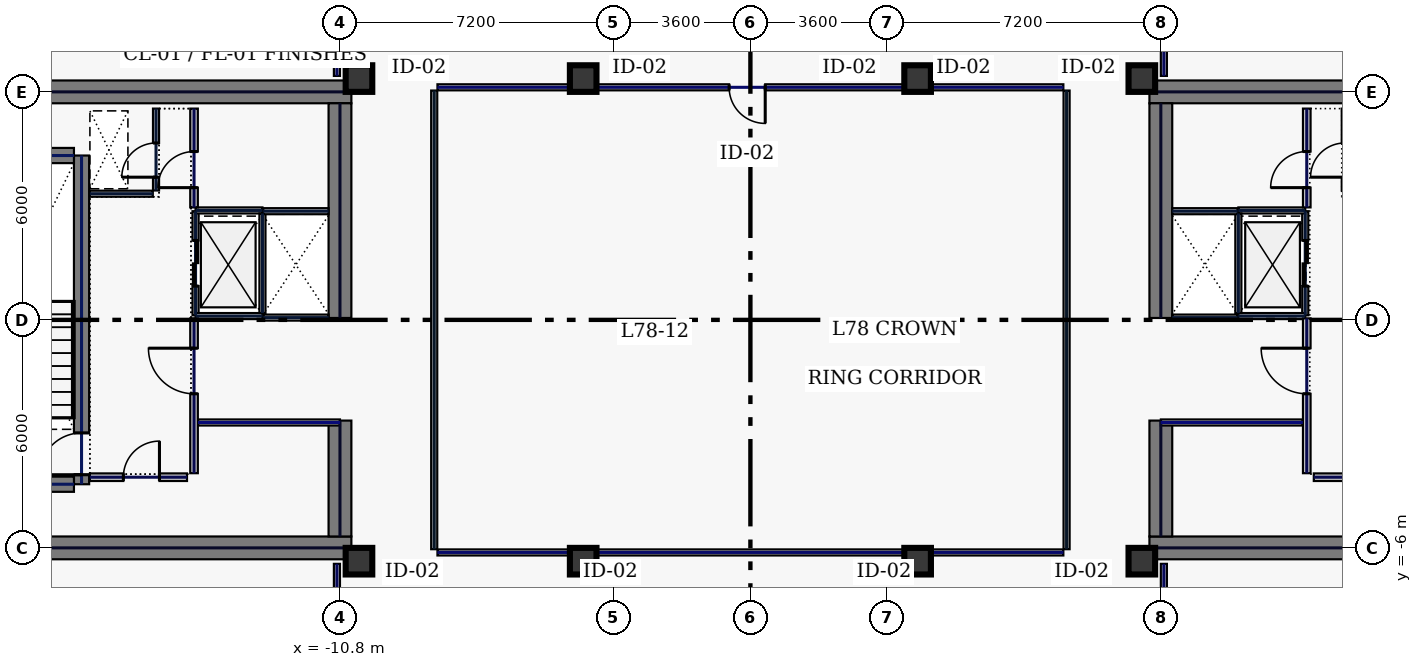
"""IFC4 building model, lengths in metres.
Left out: names, types, materials, properties, quantities, classifications, styles, units other than length and angle.
Written with IfcOpenShell. Run it as: python <this file> out.ifc"""

import sys

from ifc_helpers import new_model, si_unit, direction, frame, frame_2d, origin, origin_2d, place, context, subcontext, project, spatial, rectangle, hollow_rectangle, extrude, element, fill, save


model = new_model("IFC4")
c1 = context("Model", 3, precision=1e-05, world=origin(), true_north=direction((0.0, 1.0)))
c2 = subcontext(c1, "Body", "Model", "MODEL_VIEW")
j1 = project(units=[si_unit("LENGTHUNIT", "METRE"), si_unit("PLANEANGLEUNIT", "RADIAN")], contexts=[c1])
p1 = place(None, origin())
s1 = spatial("IfcSite", under=j1, at=p1, CompositionType="ELEMENT")
p2 = place(p1, origin())
s2 = spatial("IfcBuilding", under=s1, at=p2, CompositionType="ELEMENT")
p3 = place(p2, frame((0.0, 0.0, 333.0)))
s3 = spatial("IfcBuildingStorey", under=s2, at=p3, CompositionType="ELEMENT", Elevation=333.0)
for number, where, z_axis, x_axis in (
    (1, (-22.0, 6.0, 0.0), (0.0, 0.0, 1.0), (1.0, 0.0, 0.0)),
    (2, (-22.0, -6.0, 0.0), (0.0, 0.0, 1.0), (1.0, 0.0, 0.0)),
):
    element("IfcWall", number, at=place(p3, frame(where, z_axis=z_axis, x_axis=x_axis)), inside=s3, PredefinedType="SHEAR", context=c2, shape_type="SweptSolid", body=[
        extrude(rectangle(XDim=11.5, YDim=0.6, at=frame_2d((5.75, 0.0))), origin(), (0.0, 0.0, 1.0), 6.5),
    ])
p4 = place(p3, frame((-10.8, -5.7, 0.0), z_axis=(0.0, 0.0, 1.0), x_axis=(0.0, 1.0, 0.0)))
e3 = element("IfcWall", 3, at=p4, inside=s3, PredefinedType="SHEAR", context=c2, shape_type="SweptSolid", body=[
    extrude(rectangle(XDim=3.05, YDim=0.6, at=frame_2d((1.525, 0.0))), origin(), (0.0, 0.0, 1.0), 6.5),
])
p5 = place(p3, frame((-10.8, 0.05, 0.0), z_axis=(0.0, 0.0, 1.0), x_axis=(0.0, 1.0, 0.0)))
e4 = element("IfcWall", 4, at=p5, inside=s3, PredefinedType="SHEAR", context=c2, shape_type="SweptSolid", body=[
    extrude(rectangle(XDim=5.65, YDim=0.6, at=frame_2d((2.825, 0.0))), origin(), (0.0, 0.0, 1.0), 6.5),
])
p6 = place(p3, frame((-17.6, -4.325, 0.0), z_axis=(0.0, 0.0, 1.0), x_axis=(0.0, 1.0, 0.0)))
e5 = element("IfcWall", 5, at=p6, inside=s3, PredefinedType="SHEAR", context=c2, shape_type="SweptSolid", body=[
    extrude(rectangle(XDim=8.65, YDim=0.4, at=frame_2d((4.325, 0.0))), origin(), (0.0, 0.0, 1.0), 6.5),
])
p7 = place(p6, frame((0.25, 0.0, 0.0)))
e6 = element("IfcOpeningElement", 6, at=p7, cuts=e5, PredefinedType="OPENING", context=c2, shape_type="SweptSolid", body=[
    extrude(rectangle(XDim=1.1, YDim=2.2, at=frame_2d((0.55, 1.1))), frame((0.0, 0.21, 0.0), z_axis=(0.0, -1.0, 0.0), x_axis=(1.0, 0.0, 0.0)), (0.0, 0.0, 1.0), 0.42),
])
for number, where, z_axis, x_axis in (
    (7, (-21.2, -4.325, 0.0), (0.0, 0.0, 1.0), (1.0, 0.0, 0.0)),
    (8, (-21.2, 4.325, 0.0), (0.0, 0.0, 1.0), (1.0, 0.0, 0.0)),
):
    element("IfcWall", number, at=place(p3, frame(where, z_axis=z_axis, x_axis=x_axis)), inside=s3, PredefinedType="SHEAR", context=c2, shape_type="SweptSolid", body=[
        extrude(rectangle(XDim=3.4, YDim=0.4, at=frame_2d((1.7, 0.0))), origin(), (0.0, 0.0, 1.0), 6.5),
    ])
for number, where, z_axis, x_axis in (
    (9, (10.5, 6.0, 0.0), (0.0, 0.0, 1.0), (1.0, 0.0, 0.0)),
    (10, (10.5, -6.0, 0.0), (0.0, 0.0, 1.0), (1.0, 0.0, 0.0)),
):
    element("IfcWall", number, at=place(p3, frame(where, z_axis=z_axis, x_axis=x_axis)), inside=s3, PredefinedType="SHEAR", context=c2, shape_type="SweptSolid", body=[
        extrude(rectangle(XDim=11.5, YDim=0.6, at=frame_2d((5.75, 0.0))), origin(), (0.0, 0.0, 1.0), 6.5),
    ])
p8 = place(p3, frame((10.8, -5.7, 0.0), z_axis=(0.0, 0.0, 1.0), x_axis=(0.0, 1.0, 0.0)))
e11 = element("IfcWall", 11, at=p8, inside=s3, PredefinedType="SHEAR", context=c2, shape_type="SweptSolid", body=[
    extrude(rectangle(XDim=3.05, YDim=0.6, at=frame_2d((1.525, 0.0))), origin(), (0.0, 0.0, 1.0), 6.5),
])
p9 = place(p3, frame((10.8, 0.05, 0.0), z_axis=(0.0, 0.0, 1.0), x_axis=(0.0, 1.0, 0.0)))
e12 = element("IfcWall", 12, at=p9, inside=s3, PredefinedType="SHEAR", context=c2, shape_type="SweptSolid", body=[
    extrude(rectangle(XDim=5.65, YDim=0.6, at=frame_2d((2.825, 0.0))), origin(), (0.0, 0.0, 1.0), 6.5),
])
for number, where, z_axis, x_axis in (
    (13, (-10.3, -6.35, 0.0), (0.0, 0.0, 1.0), (1.0, 0.0, 0.0)),
    (14, (-10.3, 6.35, 0.0), (0.0, 0.0, 1.0), (1.0, 0.0, 0.0)),
    (15, (10.3, -6.35, 0.0), (0.0, 0.0, 1.0), (1.0, 0.0, 0.0)),
    (16, (10.3, 6.35, 0.0), (0.0, 0.0, 1.0), (1.0, 0.0, 0.0)),
    (17, (-4.4, -6.35, 0.0), (0.0, 0.0, 1.0), (1.0, 0.0, 0.0)),
    (18, (4.4, -6.35, 0.0), (0.0, 0.0, 1.0), (1.0, 0.0, 0.0)),
    (19, (-4.4, 6.35, 0.0), (0.0, 0.0, 1.0), (1.0, 0.0, 0.0)),
    (20, (4.4, 6.35, 0.0), (0.0, 0.0, 1.0), (1.0, 0.0, 0.0)),
):
    element("IfcColumn", number, at=place(p3, frame(where, z_axis=z_axis, x_axis=x_axis)), inside=s3, PredefinedType="COLUMN", context=c2, shape_type="SweptSolid", body=[
        extrude(hollow_rectangle(XDim=0.7, YDim=0.7, WallThickness=0.032, at=origin_2d()), origin(), (0.0, 0.0, 1.0), 6.5),
    ])
p10 = place(p3, frame((-14.6, 0.12, 0.0), z_axis=(0.0, 0.0, 1.0), x_axis=(0.0, 1.0, 0.0)))
e21 = element("IfcWall", 21, at=p10, inside=s3, PredefinedType="PARTITIONING", context=c2, shape_type="SweptSolid", body=[
    extrude(rectangle(XDim=2.74, YDim=0.16, at=frame_2d((1.37, 0.0))), origin(), (0.0, 0.0, 1.0), 6.5),
])
p11 = place(p10, frame((0.77, 0.0, 0.0)))
e22 = element("IfcOpeningElement", 22, at=p11, cuts=e21, PredefinedType="OPENING", context=c2, shape_type="SweptSolid", body=[
    extrude(rectangle(XDim=1.2, YDim=2.2, at=frame_2d((0.6, 1.1))), frame((0.0, 0.09, 0.0), z_axis=(0.0, -1.0, 0.0), x_axis=(1.0, 0.0, 0.0)), (0.0, 0.0, 1.0), 0.18),
])
for number, where, z_axis, x_axis in (
    (23, (-14.6, 0.1, 0.0), (0.0, 0.0, 1.0), (1.0, 0.0, 0.0)),
    (24, (-14.6, 2.88, 0.0), (0.0, 0.0, 1.0), (1.0, 0.0, 0.0)),
):
    element("IfcWall", number, at=place(p3, frame(where, z_axis=z_axis, x_axis=x_axis)), inside=s3, PredefinedType="PARTITIONING", context=c2, shape_type="SweptSolid", body=[
        extrude(rectangle(XDim=1.76, YDim=0.16, at=frame_2d((0.88, 0.0))), origin(), (0.0, 0.0, 1.0), 6.5),
    ])
p12 = place(p3, frame((-12.84, 0.18, 0.0), z_axis=(0.0, 0.0, 1.0), x_axis=(0.0, 1.0, 0.0)))
e25 = element("IfcWall", 25, at=p12, inside=s3, PredefinedType="PARTITIONING", context=c2, shape_type="SweptSolid", body=[
    extrude(rectangle(XDim=2.62, YDim=0.16, at=frame_2d((1.31, 0.0))), origin(), (0.0, 0.0, 1.0), 6.5),
])
for number, where, z_axis, x_axis in (
    (26, (-12.82, 0.06, 0.0), (0.0, 0.0, 1.0), (1.0, 0.0, 0.0)),
    (27, (-12.82, 2.86, 0.0), (0.0, 0.0, 1.0), (1.0, 0.0, 0.0)),
):
    element("IfcWall", number, at=place(p3, frame(where, z_axis=z_axis, x_axis=x_axis)), inside=s3, PredefinedType="PARTITIONING", context=c2, shape_type="SweptSolid", body=[
        extrude(rectangle(XDim=1.72, YDim=0.16, at=frame_2d((0.86, 0.0))), origin(), (0.0, 0.0, 1.0), 6.5),
    ])
p13 = place(p3, frame((14.6, 0.12, 0.0), z_axis=(0.0, 0.0, 1.0), x_axis=(0.0, 1.0, 0.0)))
e28 = element("IfcWall", 28, at=p13, inside=s3, PredefinedType="PARTITIONING", context=c2, shape_type="SweptSolid", body=[
    extrude(rectangle(XDim=2.74, YDim=0.16, at=frame_2d((1.37, 0.0))), origin(), (0.0, 0.0, 1.0), 6.5),
])
p14 = place(p13, frame((0.77, 0.0, 0.0)))
e29 = element("IfcOpeningElement", 29, at=p14, cuts=e28, PredefinedType="OPENING", context=c2, shape_type="SweptSolid", body=[
    extrude(rectangle(XDim=1.2, YDim=2.2, at=frame_2d((0.6, 1.1))), frame((0.0, 0.09, 0.0), z_axis=(0.0, -1.0, 0.0), x_axis=(1.0, 0.0, 0.0)), (0.0, 0.0, 1.0), 0.18),
])
for number, where, z_axis, x_axis in (
    (30, (12.84, 0.1, 0.0), (0.0, 0.0, 1.0), (1.0, 0.0, 0.0)),
    (31, (12.84, 2.88, 0.0), (0.0, 0.0, 1.0), (1.0, 0.0, 0.0)),
):
    element("IfcWall", number, at=place(p3, frame(where, z_axis=z_axis, x_axis=x_axis)), inside=s3, PredefinedType="PARTITIONING", context=c2, shape_type="SweptSolid", body=[
        extrude(rectangle(XDim=1.76, YDim=0.16, at=frame_2d((0.88, 0.0))), origin(), (0.0, 0.0, 1.0), 6.5),
    ])
p15 = place(p3, frame((12.84, 0.18, 0.0), z_axis=(0.0, 0.0, 1.0), x_axis=(0.0, 1.0, 0.0)))
e32 = element("IfcWall", 32, at=p15, inside=s3, PredefinedType="PARTITIONING", context=c2, shape_type="SweptSolid", body=[
    extrude(rectangle(XDim=2.62, YDim=0.16, at=frame_2d((1.31, 0.0))), origin(), (0.0, 0.0, 1.0), 6.5),
])
for number, where, z_axis, x_axis in (
    (33, (11.1, 0.06, 0.0), (0.0, 0.0, 1.0), (1.0, 0.0, 0.0)),
    (34, (11.1, 2.86, 0.0), (0.0, 0.0, 1.0), (1.0, 0.0, 0.0)),
):
    element("IfcWall", number, at=place(p3, frame(where, z_axis=z_axis, x_axis=x_axis)), inside=s3, PredefinedType="PARTITIONING", context=c2, shape_type="SweptSolid", body=[
        extrude(rectangle(XDim=1.72, YDim=0.16, at=frame_2d((0.86, 0.0))), origin(), (0.0, 0.0, 1.0), 6.5),
    ])
p16 = place(p3, frame((-15.64, 3.405, 0.0), z_axis=(0.0, 0.0, 1.0), x_axis=(0.0, 1.0, 0.0)))
e35 = element("IfcWall", 35, at=p16, inside=s3, PredefinedType="PARTITIONING", context=c2, shape_type="SweptSolid", body=[
    extrude(rectangle(XDim=2.155, YDim=0.16, at=frame_2d((1.078, 0.0))), origin(), (0.0, 0.0, 1.0), 6.5),
])
p17 = place(p16, frame((0.35, 0.0, 0.0)))
e36 = element("IfcOpeningElement", 36, at=p17, cuts=e35, PredefinedType="OPENING", context=c2, shape_type="SweptSolid", body=[
    extrude(rectangle(XDim=0.9, YDim=2.2, at=frame_2d((0.45, 1.1))), frame((0.0, 0.09, 0.0), z_axis=(0.0, -1.0, 0.0), x_axis=(1.0, 0.0, 0.0)), (0.0, 0.0, 1.0), 0.18),
])
p18 = place(p3, frame((-17.38, 3.32, 0.0), z_axis=(0.0, 0.0, 1.0), x_axis=(1.0, 0.0, 0.0)))
e37 = element("IfcWall", 37, at=p18, inside=s3, PredefinedType="PARTITIONING", context=c2, shape_type="SweptSolid", body=[
    extrude(rectangle(XDim=1.655, YDim=0.16, at=frame_2d((0.827, 0.0))), origin(), (0.0, 0.0, 1.0), 6.5),
])
p19 = place(p3, frame((-17.38, -4.14, 0.0), z_axis=(0.0, 0.0, 1.0), x_axis=(1.0, 0.0, 0.0)))
e38 = element("IfcWall", 38, at=p19, inside=s3, PredefinedType="SOLIDWALL", context=c2, shape_type="SweptSolid", body=[
    extrude(rectangle(XDim=2.555, YDim=0.2, at=frame_2d((1.277, 0.0))), origin(), (0.0, 0.0, 1.0), 6.5),
])
p20 = place(p19, frame((0.88, 0.0, 0.0)))
e39 = element("IfcOpeningElement", 39, at=p20, cuts=e38, PredefinedType="OPENING", context=c2, shape_type="SweptSolid", body=[
    extrude(rectangle(XDim=0.95, YDim=2.2, at=frame_2d((0.475, 1.1))), frame((0.0, 0.11, 0.0), z_axis=(0.0, -1.0, 0.0), x_axis=(1.0, 0.0, 0.0)), (0.0, 0.0, 1.0), 0.22),
])
p21 = place(p3, frame((-14.535, -2.7, 0.0), z_axis=(0.0, 0.0, 1.0), x_axis=(1.0, 0.0, 0.0)))
e40 = element("IfcWall", 40, at=p21, inside=s3, PredefinedType="PARTITIONING", context=c2, shape_type="SweptSolid", body=[
    extrude(rectangle(XDim=3.735, YDim=0.16, at=frame_2d((1.867, 0.0))), origin(), (0.0, 0.0, 1.0), 6.5),
])
p22 = place(p3, frame((-14.64, 2.96, 0.0), z_axis=(0.0, 0.0, 1.0), x_axis=(0.0, 1.0, 0.0)))
e41 = element("IfcWall", 41, at=p22, inside=s3, PredefinedType="SOLIDWALL", context=c2, shape_type="SweptSolid", body=[
    extrude(rectangle(XDim=2.6, YDim=0.2, at=frame_2d((1.3, 0.0))), origin(), (0.0, 0.0, 1.0), 6.5),
])
p23 = place(p22, frame((0.52, 0.0, 0.0)))
e42 = element("IfcOpeningElement", 42, at=p23, cuts=e41, PredefinedType="OPENING", context=c2, shape_type="SweptSolid", body=[
    extrude(rectangle(XDim=0.95, YDim=2.2, at=frame_2d((0.475, 1.1))), frame((0.0, 0.11, 0.0), z_axis=(0.0, -1.0, 0.0), x_axis=(1.0, 0.0, 0.0)), (0.0, 0.0, 1.0), 0.22),
])
p24 = place(p3, frame((-14.64, -4.035, 0.0), z_axis=(0.0, 0.0, 1.0), x_axis=(0.0, 1.0, 0.0)))
e43 = element("IfcWall", 43, at=p24, inside=s3, PredefinedType="SOLIDWALL", context=c2, shape_type="SweptSolid", body=[
    extrude(rectangle(XDim=4.075, YDim=0.2, at=frame_2d((2.038, 0.0))), origin(), (0.0, 0.0, 1.0), 6.5),
])
p25 = place(p24, frame((2.09, 0.0, 0.0)))
e44 = element("IfcOpeningElement", 44, at=p25, cuts=e43, PredefinedType="OPENING", context=c2, shape_type="SweptSolid", body=[
    extrude(rectangle(XDim=1.2, YDim=2.2, at=frame_2d((0.6, 1.1))), frame((0.0, 0.11, 0.0), z_axis=(0.0, -1.0, 0.0), x_axis=(1.0, 0.0, 0.0)), (0.0, 0.0, 1.0), 0.22),
])
p26 = place(p3, frame((15.64, 3.405, 0.0), z_axis=(0.0, 0.0, 1.0), x_axis=(0.0, 1.0, 0.0)))
e45 = element("IfcWall", 45, at=p26, inside=s3, PredefinedType="PARTITIONING", context=c2, shape_type="SweptSolid", body=[
    extrude(rectangle(XDim=2.155, YDim=0.16, at=frame_2d((1.078, 0.0))), origin(), (0.0, 0.0, 1.0), 6.5),
])
p27 = place(p26, frame((0.35, 0.0, 0.0)))
e46 = element("IfcOpeningElement", 46, at=p27, cuts=e45, PredefinedType="OPENING", context=c2, shape_type="SweptSolid", body=[
    extrude(rectangle(XDim=0.9, YDim=2.2, at=frame_2d((0.45, 1.1))), frame((0.0, 0.09, 0.0), z_axis=(0.0, -1.0, 0.0), x_axis=(1.0, 0.0, 0.0)), (0.0, 0.0, 1.0), 0.18),
])
p28 = place(p3, frame((14.825, -4.14, 0.0), z_axis=(0.0, 0.0, 1.0), x_axis=(1.0, 0.0, 0.0)))
e47 = element("IfcWall", 47, at=p28, inside=s3, PredefinedType="SOLIDWALL", context=c2, shape_type="SweptSolid", body=[
    extrude(rectangle(XDim=2.555, YDim=0.2, at=frame_2d((1.277, 0.0))), origin(), (0.0, 0.0, 1.0), 6.5),
])
p29 = place(p28, frame((0.88, 0.0, 0.0)))
e48 = element("IfcOpeningElement", 48, at=p29, cuts=e47, PredefinedType="OPENING", context=c2, shape_type="SweptSolid", body=[
    extrude(rectangle(XDim=0.95, YDim=2.2, at=frame_2d((0.475, 1.1))), frame((0.0, 0.11, 0.0), z_axis=(0.0, -1.0, 0.0), x_axis=(1.0, 0.0, 0.0)), (0.0, 0.0, 1.0), 0.22),
])
p30 = place(p3, frame((10.8, -2.7, 0.0), z_axis=(0.0, 0.0, 1.0), x_axis=(1.0, 0.0, 0.0)))
e49 = element("IfcWall", 49, at=p30, inside=s3, PredefinedType="PARTITIONING", context=c2, shape_type="SweptSolid", body=[
    extrude(rectangle(XDim=3.735, YDim=0.16, at=frame_2d((1.867, 0.0))), origin(), (0.0, 0.0, 1.0), 6.5),
])
p31 = place(p3, frame((14.64, 2.96, 0.0), z_axis=(0.0, 0.0, 1.0), x_axis=(0.0, 1.0, 0.0)))
e50 = element("IfcWall", 50, at=p31, inside=s3, PredefinedType="SOLIDWALL", context=c2, shape_type="SweptSolid", body=[
    extrude(rectangle(XDim=2.6, YDim=0.2, at=frame_2d((1.3, 0.0))), origin(), (0.0, 0.0, 1.0), 6.5),
])
p32 = place(p31, frame((0.52, 0.0, 0.0)))
e51 = element("IfcOpeningElement", 51, at=p32, cuts=e50, PredefinedType="OPENING", context=c2, shape_type="SweptSolid", body=[
    extrude(rectangle(XDim=0.95, YDim=2.2, at=frame_2d((0.475, 1.1))), frame((0.0, 0.11, 0.0), z_axis=(0.0, -1.0, 0.0), x_axis=(1.0, 0.0, 0.0)), (0.0, 0.0, 1.0), 0.22),
])
p33 = place(p3, frame((14.64, -4.035, 0.0), z_axis=(0.0, 0.0, 1.0), x_axis=(0.0, 1.0, 0.0)))
e52 = element("IfcWall", 52, at=p33, inside=s3, PredefinedType="SOLIDWALL", context=c2, shape_type="SweptSolid", body=[
    extrude(rectangle(XDim=4.075, YDim=0.2, at=frame_2d((2.038, 0.0))), origin(), (0.0, 0.0, 1.0), 6.5),
])
p34 = place(p33, frame((2.09, 0.0, 0.0)))
e53 = element("IfcOpeningElement", 53, at=p34, cuts=e52, PredefinedType="OPENING", context=c2, shape_type="SweptSolid", body=[
    extrude(rectangle(XDim=1.2, YDim=2.2, at=frame_2d((0.6, 1.1))), frame((0.0, 0.11, 0.0), z_axis=(0.0, -1.0, 0.0), x_axis=(1.0, 0.0, 0.0)), (0.0, 0.0, 1.0), 0.22),
])
for number, where, z_axis, x_axis in (
    (54, (-10.88, -8.215, 0.0), (0.0, 0.0, 1.0), (0.0, 1.0, 0.0)),
    (55, (-10.88, 6.42, 0.0), (0.0, 0.0, 1.0), (0.0, 1.0, 0.0)),
    (56, (10.88, 8.215, 0.0), (0.0, 0.0, 1.0), (0.0, -1.0, 0.0)),
    (57, (10.88, -6.42, 0.0), (0.0, 0.0, 1.0), (0.0, -1.0, 0.0)),
):
    element("IfcWall", number, at=place(p3, frame(where, z_axis=z_axis, x_axis=x_axis)), inside=s3, PredefinedType="PARTITIONING", context=c2, shape_type="SweptSolid", body=[
        extrude(rectangle(XDim=1.795, YDim=0.16, at=frame_2d((0.897, 0.0))), origin(), (0.0, 0.0, 1.0), 4.895),
    ])
p35 = place(p3, frame((8.32, -6.035, 0.0), z_axis=(0.0, 0.0, 1.0), x_axis=(0.0, 1.0, 0.0)))
e58 = element("IfcWall", 58, at=p35, inside=s3, PredefinedType="PARTITIONING", context=c2, shape_type="SweptSolid", body=[
    extrude(rectangle(XDim=12.07, YDim=0.16, at=frame_2d((6.035, 0.0))), origin(), (0.0, 0.0, 1.0), 6.5),
])
p36 = place(p3, frame((8.235, 6.12, 0.0), z_axis=(0.0, 0.0, 1.0), x_axis=(-1.0, 0.0, 0.0)))
e59 = element("IfcWall", 59, at=p36, inside=s3, PredefinedType="PARTITIONING", context=c2, shape_type="SweptSolid", body=[
    extrude(rectangle(XDim=16.47, YDim=0.16, at=frame_2d((8.235, 0.0))), origin(), (0.0, 0.0, 1.0), 5.795),
])
p37 = place(p36, frame((7.845, 0.0, 0.0)))
e60 = element("IfcOpeningElement", 60, at=p37, cuts=e59, PredefinedType="OPENING", context=c2, shape_type="SweptSolid", body=[
    extrude(rectangle(XDim=0.95, YDim=2.2, at=frame_2d((0.475, 1.1))), frame((0.0, 0.09, 0.0), z_axis=(0.0, -1.0, 0.0), x_axis=(1.0, 0.0, 0.0)), (0.0, 0.0, 1.0), 0.18),
])
p38 = place(p3, frame((-8.32, 6.035, 0.0), z_axis=(0.0, 0.0, 1.0), x_axis=(0.0, -1.0, 0.0)))
e61 = element("IfcWall", 61, at=p38, inside=s3, PredefinedType="PARTITIONING", context=c2, shape_type="SweptSolid", body=[
    extrude(rectangle(XDim=12.07, YDim=0.16, at=frame_2d((6.035, 0.0))), origin(), (0.0, 0.0, 1.0), 6.5),
])
p39 = place(p3, frame((-8.235, -6.12, 0.0), z_axis=(0.0, 0.0, 1.0), x_axis=(1.0, 0.0, 0.0)))
e62 = element("IfcWall", 62, at=p39, inside=s3, PredefinedType="PARTITIONING", context=c2, shape_type="SweptSolid", body=[
    extrude(rectangle(XDim=16.47, YDim=0.16, at=frame_2d((8.235, 0.0))), origin(), (0.0, 0.0, 1.0), 5.795),
])
p40 = place(p7, origin())
e63 = element("IfcDoor", 63, at=p40, inside=s3, OperationType="SINGLE_SWING_LEFT", PredefinedType="DOOR", context=c2, shape_type="SweptSolid", body=[
    extrude(rectangle(XDim=1.1, YDim=2.2, at=frame_2d((0.55, 1.1))), frame((0.0, 0.025, 0.0), z_axis=(0.0, -1.0, 0.0), x_axis=(1.0, 0.0, 0.0)), (0.0, 0.0, 1.0), 0.05),
])
fill(e6, e63)
p41 = place(p11, origin())
e64 = element("IfcDoor", 64, at=p41, inside=s3, OperationType="SLIDING_TO_LEFT", PredefinedType="DOOR", context=c2, shape_type="SweptSolid", body=[
    extrude(rectangle(XDim=1.2, YDim=2.2, at=frame_2d((0.6, 1.1))), frame((0.0, 0.025, 0.0), z_axis=(0.0, -1.0, 0.0), x_axis=(1.0, 0.0, 0.0)), (0.0, 0.0, 1.0), 0.05),
])
fill(e22, e64)
p42 = place(p14, origin())
e65 = element("IfcDoor", 65, at=p42, inside=s3, OperationType="SLIDING_TO_LEFT", PredefinedType="DOOR", context=c2, shape_type="SweptSolid", body=[
    extrude(rectangle(XDim=1.2, YDim=2.2, at=frame_2d((0.6, 1.1))), frame((0.0, 0.025, 0.0), z_axis=(0.0, -1.0, 0.0), x_axis=(1.0, 0.0, 0.0)), (0.0, 0.0, 1.0), 0.05),
])
fill(e29, e65)
p43 = place(p17, origin())
e66 = element("IfcDoor", 66, at=p43, inside=s3, OperationType="SINGLE_SWING_LEFT", PredefinedType="DOOR", context=c2, shape_type="SweptSolid", body=[
    extrude(rectangle(XDim=0.9, YDim=2.2, at=frame_2d((0.45, 1.1))), frame((0.0, 0.025, 0.0), z_axis=(0.0, -1.0, 0.0), x_axis=(1.0, 0.0, 0.0)), (0.0, 0.0, 1.0), 0.05),
])
fill(e36, e66)
p44 = place(p20, origin())
e67 = element("IfcDoor", 67, at=p44, inside=s3, OperationType="SINGLE_SWING_RIGHT", PredefinedType="DOOR", context=c2, shape_type="SweptSolid", body=[
    extrude(rectangle(XDim=0.95, YDim=2.2, at=frame_2d((0.475, 1.1))), frame((0.0, 0.025, 0.0), z_axis=(0.0, -1.0, 0.0), x_axis=(1.0, 0.0, 0.0)), (0.0, 0.0, 1.0), 0.05),
])
fill(e39, e67)
p45 = place(p23, origin())
e68 = element("IfcDoor", 68, at=p45, inside=s3, OperationType="SINGLE_SWING_LEFT", PredefinedType="DOOR", context=c2, shape_type="SweptSolid", body=[
    extrude(rectangle(XDim=0.95, YDim=2.2, at=frame_2d((0.475, 1.1))), frame((0.0, 0.025, 0.0), z_axis=(0.0, -1.0, 0.0), x_axis=(1.0, 0.0, 0.0)), (0.0, 0.0, 1.0), 0.05),
])
fill(e42, e68)
p46 = place(p25, origin())
e69 = element("IfcDoor", 69, at=p46, inside=s3, OperationType="SINGLE_SWING_RIGHT", PredefinedType="DOOR", context=c2, shape_type="SweptSolid", body=[
    extrude(rectangle(XDim=1.2, YDim=2.2, at=frame_2d((0.6, 1.1))), frame((0.0, 0.025, 0.0), z_axis=(0.0, -1.0, 0.0), x_axis=(1.0, 0.0, 0.0)), (0.0, 0.0, 1.0), 0.05),
])
fill(e44, e69)
p47 = place(p32, origin())
e70 = element("IfcDoor", 70, at=p47, inside=s3, OperationType="SINGLE_SWING_LEFT", PredefinedType="DOOR", context=c2, shape_type="SweptSolid", body=[
    extrude(rectangle(XDim=0.95, YDim=2.2, at=frame_2d((0.475, 1.1))), frame((0.0, 0.025, 0.0), z_axis=(0.0, -1.0, 0.0), x_axis=(1.0, 0.0, 0.0)), (0.0, 0.0, 1.0), 0.05),
])
fill(e51, e70)
p48 = place(p34, origin())
e71 = element("IfcDoor", 71, at=p48, inside=s3, OperationType="SINGLE_SWING_RIGHT", PredefinedType="DOOR", context=c2, shape_type="SweptSolid", body=[
    extrude(rectangle(XDim=1.2, YDim=2.2, at=frame_2d((0.6, 1.1))), frame((0.0, 0.025, 0.0), z_axis=(0.0, -1.0, 0.0), x_axis=(1.0, 0.0, 0.0)), (0.0, 0.0, 1.0), 0.05),
])
fill(e53, e71)
p49 = place(p37, origin())
e72 = element("IfcDoor", 72, at=p49, inside=s3, OperationType="SINGLE_SWING_LEFT", PredefinedType="DOOR", context=c2, shape_type="SweptSolid", body=[
    extrude(rectangle(XDim=0.95, YDim=2.2, at=frame_2d((0.475, 1.1))), frame((0.0, 0.025, 0.0), z_axis=(0.0, -1.0, 0.0), x_axis=(1.0, 0.0, 0.0)), (0.0, 0.0, 1.0), 0.05),
])
fill(e60, e72)
save(model, sys.argv[1])
